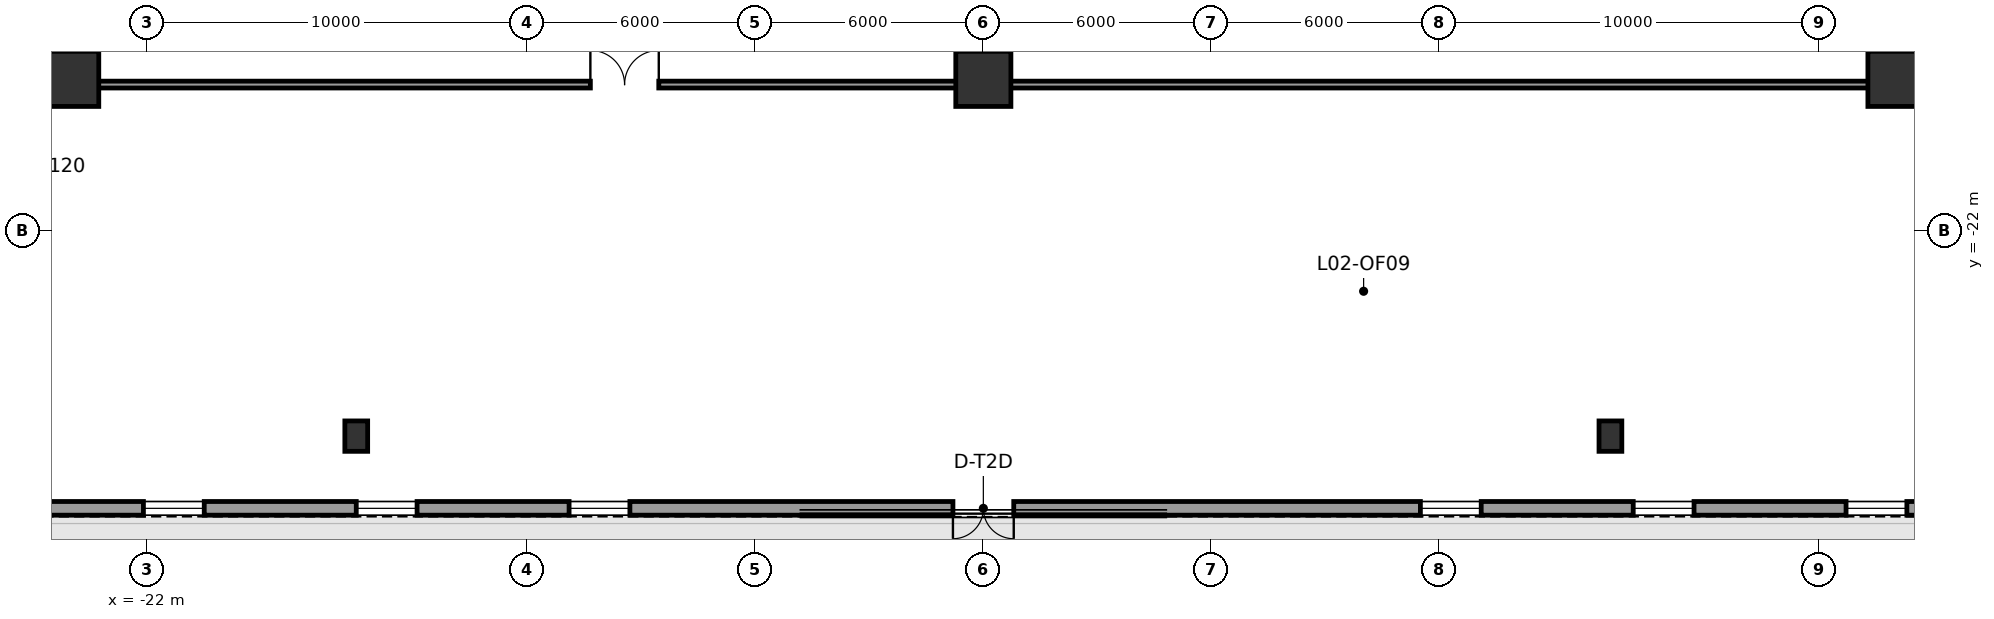
"""IFC4 building model, lengths in metres.
Left out: names, types, materials, properties, quantities, classifications, styles, units other than length and angle.
Written with IfcOpenShell. Run it as: python <this file> out.ifc"""

import sys

from ifc_helpers import new_model, si_unit, direction, frame, frame_2d, origin, origin_2d, place, context, subcontext, project, spatial, rectangle, hollow_rectangle, extrude, element, fill, save


model = new_model("IFC4")
c1 = context("Model", 3, precision=1e-05, world=origin(), true_north=direction((0.0, 1.0)))
c2 = subcontext(c1, "Body", "Model", "MODEL_VIEW")
j1 = project(units=[si_unit("LENGTHUNIT", "METRE"), si_unit("PLANEANGLEUNIT", "RADIAN")], contexts=[c1])
p1 = place(None, origin())
s1 = spatial("IfcSite", under=j1, at=p1, CompositionType="ELEMENT")
p2 = place(p1, origin())
s2 = spatial("IfcBuilding", under=s1, at=p2, CompositionType="ELEMENT")
p3 = place(p2, frame((0.0, 0.0, 11.5)))
s3 = spatial("IfcBuildingStorey", under=s2, at=p3, CompositionType="ELEMENT", Elevation=11.5)
for number, where, z_axis, x_axis in (
    (1, (-24.0, -18.0, 0.0), (0.0, 0.0, 1.0), (1.0, 0.0, 0.0)),
    (2, (24.0, -18.0, 0.0), (0.0, 0.0, 1.0), (1.0, 0.0, 0.0)),
    (3, (0.0, -18.0, 0.0), (0.0, 0.0, 1.0), (1.0, 0.0, 0.0)),
):
    element("IfcColumn", number, at=place(p3, frame(where, z_axis=z_axis, x_axis=x_axis)), inside=s3, PredefinedType="COLUMN", context=c2, shape_type="SweptSolid", body=[
        extrude(rectangle(XDim=1.45, YDim=1.45, at=origin_2d()), origin(), (0.0, 0.0, 1.0), 6.0),
    ])
for number, where, z_axis, x_axis in (
    (4, (-16.5, -27.4, 0.0), (0.0, 0.0, 1.0), (1.0, 0.0, 0.0)),
    (5, (16.5, -27.4, 0.0), (0.0, 0.0, 1.0), (1.0, 0.0, 0.0)),
):
    element("IfcColumn", number, at=place(p3, frame(where, z_axis=z_axis, x_axis=x_axis)), inside=s3, PredefinedType="COLUMN", context=c2, shape_type="SweptSolid", body=[
        extrude(hollow_rectangle(XDim=0.6, YDim=0.8, WallThickness=0.05, at=origin_2d()), origin(), (0.0, 0.0, 1.0), 6.0),
    ])
p4 = place(p3, frame((40.3, -29.3, 0.0), z_axis=(0.0, 0.0, 1.0), x_axis=(-1.0, 0.0, 0.0)))
e6 = element("IfcWall", 6, at=p4, inside=s3, PredefinedType="STANDARD", context=c2, shape_type="SweptSolid", body=[
    extrude(rectangle(XDim=80.6, YDim=0.36, at=frame_2d((40.3, 0.0))), origin(), (0.0, 0.0, 1.0), 5.7),
])
p5 = place(p4, frame((39.5, 0.0, 0.0)))
e7 = element("IfcOpeningElement", 7, at=p5, cuts=e6, PredefinedType="OPENING", context=c2, shape_type="SweptSolid", body=[
    extrude(rectangle(XDim=1.6, YDim=2.2, at=frame_2d((0.8, 1.1))), frame((0.0, 0.19, 0.0), z_axis=(0.0, -1.0, 0.0), x_axis=(1.0, 0.0, 0.0)), (0.0, 0.0, 1.0), 0.38),
])
p6 = place(p4, frame((4.8, 0.0, 0.9)))
e8 = element("IfcOpeningElement", 8, at=p6, cuts=e6, PredefinedType="OPENING", context=c2, shape_type="SweptSolid", body=[
    extrude(rectangle(XDim=1.6, YDim=2.6, at=frame_2d((0.8, 1.3))), frame((0.0, 0.19, 0.0), z_axis=(0.0, -1.0, 0.0), x_axis=(1.0, 0.0, 0.0)), (0.0, 0.0, 1.0), 0.38),
])
p7 = place(p4, frame((10.4, 0.0, 0.9)))
e9 = element("IfcOpeningElement", 9, at=p7, cuts=e6, PredefinedType="OPENING", context=c2, shape_type="SweptSolid", body=[
    extrude(rectangle(XDim=1.6, YDim=2.6, at=frame_2d((0.8, 1.3))), frame((0.0, 0.19, 0.0), z_axis=(0.0, -1.0, 0.0), x_axis=(1.0, 0.0, 0.0)), (0.0, 0.0, 1.0), 0.38),
])
p8 = place(p4, frame((16.0, 0.0, 0.9)))
e10 = element("IfcOpeningElement", 10, at=p8, cuts=e6, PredefinedType="OPENING", context=c2, shape_type="SweptSolid", body=[
    extrude(rectangle(XDim=1.6, YDim=2.6, at=frame_2d((0.8, 1.3))), frame((0.0, 0.19, 0.0), z_axis=(0.0, -1.0, 0.0), x_axis=(1.0, 0.0, 0.0)), (0.0, 0.0, 1.0), 0.38),
])
p9 = place(p4, frame((21.6, 0.0, 0.9)))
e11 = element("IfcOpeningElement", 11, at=p9, cuts=e6, PredefinedType="OPENING", context=c2, shape_type="SweptSolid", body=[
    extrude(rectangle(XDim=1.6, YDim=2.6, at=frame_2d((0.8, 1.3))), frame((0.0, 0.19, 0.0), z_axis=(0.0, -1.0, 0.0), x_axis=(1.0, 0.0, 0.0)), (0.0, 0.0, 1.0), 0.38),
])
p10 = place(p4, frame((27.2, 0.0, 0.9)))
e12 = element("IfcOpeningElement", 12, at=p10, cuts=e6, PredefinedType="OPENING", context=c2, shape_type="SweptSolid", body=[
    extrude(rectangle(XDim=1.6, YDim=2.6, at=frame_2d((0.8, 1.3))), frame((0.0, 0.19, 0.0), z_axis=(0.0, -1.0, 0.0), x_axis=(1.0, 0.0, 0.0)), (0.0, 0.0, 1.0), 0.38),
])
p11 = place(p4, frame((49.6, 0.0, 0.9)))
e13 = element("IfcOpeningElement", 13, at=p11, cuts=e6, PredefinedType="OPENING", context=c2, shape_type="SweptSolid", body=[
    extrude(rectangle(XDim=1.6, YDim=2.6, at=frame_2d((0.8, 1.3))), frame((0.0, 0.19, 0.0), z_axis=(0.0, -1.0, 0.0), x_axis=(1.0, 0.0, 0.0)), (0.0, 0.0, 1.0), 0.38),
])
p12 = place(p4, frame((55.2, 0.0, 0.9)))
e14 = element("IfcOpeningElement", 14, at=p12, cuts=e6, PredefinedType="OPENING", context=c2, shape_type="SweptSolid", body=[
    extrude(rectangle(XDim=1.6, YDim=2.6, at=frame_2d((0.8, 1.3))), frame((0.0, 0.19, 0.0), z_axis=(0.0, -1.0, 0.0), x_axis=(1.0, 0.0, 0.0)), (0.0, 0.0, 1.0), 0.38),
])
p13 = place(p4, frame((60.8, 0.0, 0.9)))
e15 = element("IfcOpeningElement", 15, at=p13, cuts=e6, PredefinedType="OPENING", context=c2, shape_type="SweptSolid", body=[
    extrude(rectangle(XDim=1.6, YDim=2.6, at=frame_2d((0.8, 1.3))), frame((0.0, 0.19, 0.0), z_axis=(0.0, -1.0, 0.0), x_axis=(1.0, 0.0, 0.0)), (0.0, 0.0, 1.0), 0.38),
])
p14 = place(p4, frame((66.4, 0.0, 0.9)))
e16 = element("IfcOpeningElement", 16, at=p14, cuts=e6, PredefinedType="OPENING", context=c2, shape_type="SweptSolid", body=[
    extrude(rectangle(XDim=1.6, YDim=2.6, at=frame_2d((0.8, 1.3))), frame((0.0, 0.19, 0.0), z_axis=(0.0, -1.0, 0.0), x_axis=(1.0, 0.0, 0.0)), (0.0, 0.0, 1.0), 0.38),
])
p15 = place(p4, frame((72.0, 0.0, 0.9)))
e17 = element("IfcOpeningElement", 17, at=p15, cuts=e6, PredefinedType="OPENING", context=c2, shape_type="SweptSolid", body=[
    extrude(rectangle(XDim=1.6, YDim=2.6, at=frame_2d((0.8, 1.3))), frame((0.0, 0.19, 0.0), z_axis=(0.0, -1.0, 0.0), x_axis=(1.0, 0.0, 0.0)), (0.0, 0.0, 1.0), 0.38),
])
p16 = place(p3, frame((-23.6, -18.15, 0.0), z_axis=(0.0, 0.0, 1.0), x_axis=(1.0, 0.0, 0.0)))
e18 = element("IfcWall", 18, at=p16, inside=s3, PredefinedType="PARTITIONING", context=c2, shape_type="SweptSolid", body=[
    extrude(rectangle(XDim=47.2, YDim=0.18, at=frame_2d((23.6, 0.0))), origin(), (0.0, 0.0, 1.0), 3.88),
])
p17 = place(p16, frame((13.26, 0.0, 0.0)))
e19 = element("IfcOpeningElement", 19, at=p17, cuts=e18, PredefinedType="OPENING", context=c2, shape_type="SweptSolid", body=[
    extrude(rectangle(XDim=1.8, YDim=2.2, at=frame_2d((0.9, 1.1))), frame((0.0, 0.1, 0.0), z_axis=(0.0, -1.0, 0.0), x_axis=(1.0, 0.0, 0.0)), (0.0, 0.0, 1.0), 0.2),
])
p18 = place(p5, origin())
e20 = element("IfcDoor", 20, at=p18, inside=s3, OperationType="DOUBLE_DOOR_SINGLE_SWING", PredefinedType="DOOR", context=c2, shape_type="SweptSolid", body=[
    extrude(rectangle(XDim=1.6, YDim=2.2, at=frame_2d((0.8, 1.1))), frame((0.0, 0.025, 0.0), z_axis=(0.0, -1.0, 0.0), x_axis=(1.0, 0.0, 0.0)), (0.0, 0.0, 1.0), 0.05),
])
fill(e7, e20)
p19 = place(p8, origin())
e21 = element("IfcWindow", 21, at=p19, inside=s3, PartitioningType="DOUBLE_PANEL_VERTICAL", PredefinedType="WINDOW", context=c2, shape_type="SweptSolid", body=[
    extrude(rectangle(XDim=1.6, YDim=2.6, at=frame_2d((0.8, 1.3))), frame((0.0, 0.03, 0.0), z_axis=(0.0, -1.0, 0.0), x_axis=(1.0, 0.0, 0.0)), (0.0, 0.0, 1.0), 0.06),
])
fill(e10, e21)
p20 = place(p9, origin())
e22 = element("IfcWindow", 22, at=p20, inside=s3, PartitioningType="DOUBLE_PANEL_VERTICAL", PredefinedType="WINDOW", context=c2, shape_type="SweptSolid", body=[
    extrude(rectangle(XDim=1.6, YDim=2.6, at=frame_2d((0.8, 1.3))), frame((0.0, 0.03, 0.0), z_axis=(0.0, -1.0, 0.0), x_axis=(1.0, 0.0, 0.0)), (0.0, 0.0, 1.0), 0.06),
])
fill(e11, e22)
p21 = place(p10, origin())
e23 = element("IfcWindow", 23, at=p21, inside=s3, PartitioningType="DOUBLE_PANEL_VERTICAL", PredefinedType="WINDOW", context=c2, shape_type="SweptSolid", body=[
    extrude(rectangle(XDim=1.6, YDim=2.6, at=frame_2d((0.8, 1.3))), frame((0.0, 0.03, 0.0), z_axis=(0.0, -1.0, 0.0), x_axis=(1.0, 0.0, 0.0)), (0.0, 0.0, 1.0), 0.06),
])
fill(e12, e23)
p22 = place(p11, origin())
e24 = element("IfcWindow", 24, at=p22, inside=s3, PartitioningType="DOUBLE_PANEL_VERTICAL", PredefinedType="WINDOW", context=c2, shape_type="SweptSolid", body=[
    extrude(rectangle(XDim=1.6, YDim=2.6, at=frame_2d((0.8, 1.3))), frame((0.0, 0.03, 0.0), z_axis=(0.0, -1.0, 0.0), x_axis=(1.0, 0.0, 0.0)), (0.0, 0.0, 1.0), 0.06),
])
fill(e13, e24)
p23 = place(p12, origin())
e25 = element("IfcWindow", 25, at=p23, inside=s3, PartitioningType="DOUBLE_PANEL_VERTICAL", PredefinedType="WINDOW", context=c2, shape_type="SweptSolid", body=[
    extrude(rectangle(XDim=1.6, YDim=2.6, at=frame_2d((0.8, 1.3))), frame((0.0, 0.03, 0.0), z_axis=(0.0, -1.0, 0.0), x_axis=(1.0, 0.0, 0.0)), (0.0, 0.0, 1.0), 0.06),
])
fill(e14, e25)
p24 = place(p13, origin())
e26 = element("IfcWindow", 26, at=p24, inside=s3, PartitioningType="DOUBLE_PANEL_VERTICAL", PredefinedType="WINDOW", context=c2, shape_type="SweptSolid", body=[
    extrude(rectangle(XDim=1.6, YDim=2.6, at=frame_2d((0.8, 1.3))), frame((0.0, 0.03, 0.0), z_axis=(0.0, -1.0, 0.0), x_axis=(1.0, 0.0, 0.0)), (0.0, 0.0, 1.0), 0.06),
])
fill(e15, e26)
p25 = place(p17, origin())
e27 = element("IfcDoor", 27, at=p25, inside=s3, OperationType="DOUBLE_DOOR_SINGLE_SWING", PredefinedType="DOOR", context=c2, shape_type="SweptSolid", body=[
    extrude(rectangle(XDim=1.8, YDim=2.2, at=frame_2d((0.9, 1.1))), frame((0.0, 0.025, 0.0), z_axis=(0.0, -1.0, 0.0), x_axis=(1.0, 0.0, 0.0)), (0.0, 0.0, 1.0), 0.05),
])
fill(e19, e27)
save(model, sys.argv[1])
